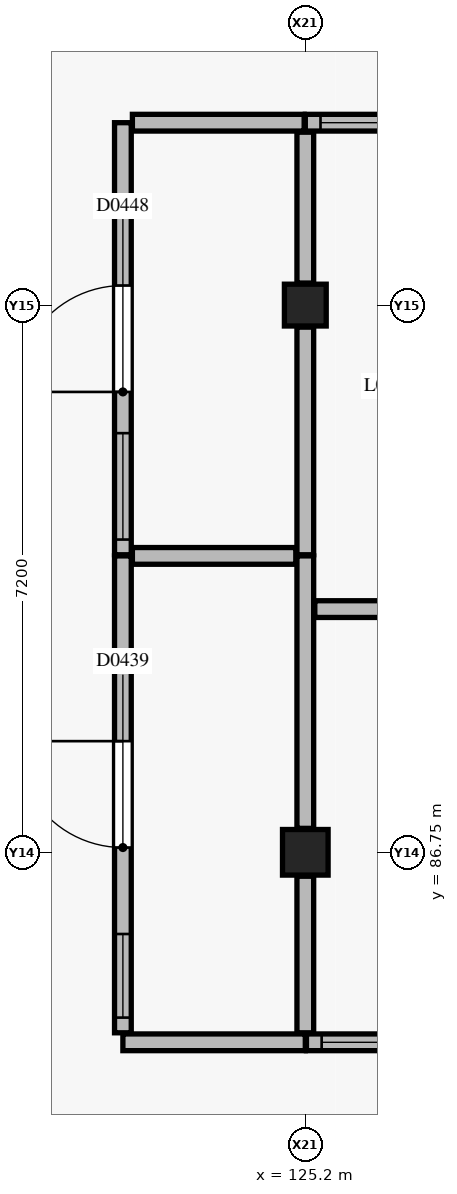
"""IFC4 building model, lengths in metres.
Left out: names, types, materials, properties, quantities, classifications, styles, units other than length and angle.
Written with IfcOpenShell. Run it as: python <this file> out.ifc"""

import sys

from ifc_helpers import new_model, si_unit, direction, frame, frame_2d, origin, origin_2d, place, context, subcontext, project, spatial, rectangle, extrude, element, fill, save


model = new_model("IFC4")
c1 = context("Model", 3, precision=1e-05, world=origin(), true_north=direction((0.0, 1.0)))
c2 = subcontext(c1, "Body", "Model", "MODEL_VIEW")
j1 = project(units=[si_unit("LENGTHUNIT", "METRE"), si_unit("PLANEANGLEUNIT", "RADIAN")], contexts=[c1])
p1 = place(None, origin())
s1 = spatial("IfcSite", under=j1, at=p1, CompositionType="ELEMENT")
p2 = place(p1, origin())
s2 = spatial("IfcBuilding", under=s1, at=p2, CompositionType="ELEMENT")
p3 = place(p2, frame((0.0, 0.0, 4.8)))
s3 = spatial("IfcBuildingStorey", under=s2, at=p3, CompositionType="ELEMENT", Elevation=4.8)
p4 = place(p3, frame((125.2, 86.75, 0.0), z_axis=(0.0, 0.0, 1.0), x_axis=(1.0, 0.0, 0.0)))
e1 = element("IfcColumn", 1, at=p4, inside=s3, PredefinedType="COLUMN", context=c2, shape_type="SweptSolid", body=[
    extrude(rectangle(XDim=0.6, YDim=0.6, at=origin_2d()), origin(), (0.0, 0.0, 1.0), 4.2),
])
p5 = place(p3, frame((125.2, 93.95, 0.0), z_axis=(0.0, 0.0, 1.0), x_axis=(1.0, 0.0, 0.0)))
e2 = element("IfcColumn", 2, at=p5, inside=s3, PredefinedType="COLUMN", context=c2, shape_type="SweptSolid", body=[
    extrude(rectangle(XDim=0.55, YDim=0.55, at=origin_2d()), origin(), (0.0, 0.0, 1.0), 4.2),
])
p6 = place(p3, frame((122.8, 84.25, 0.0), z_axis=(0.0, 0.0, 1.0), x_axis=(1.0, 0.0, 0.0)))
e3 = element("IfcWall", 3, at=p6, inside=s3, PredefinedType="PARTITIONING", context=c2, shape_type="SweptSolid", body=[
    extrude(rectangle(XDim=2.4, YDim=0.22, at=frame_2d((1.2, 0.0))), origin(), (0.0, 0.0, 1.0), 3.135),
])
p7 = place(p3, frame((122.8, 84.375, 0.0), z_axis=(0.0, 0.0, 1.0), x_axis=(0.0, 1.0, 0.0)))
e4 = element("IfcWall", 4, at=p7, inside=s3, PredefinedType="PARTITIONING", context=c2, shape_type="SweptSolid", body=[
    extrude(rectangle(XDim=6.275, YDim=0.22, at=frame_2d((3.137, 0.0))), origin(), (0.0, 0.0, 1.0), 3.285),
])
p8 = place(p7, frame((2.438, 0.0, 0.0)))
e5 = element("IfcOpeningElement", 5, at=p8, cuts=e4, PredefinedType="OPENING", context=c2, shape_type="SweptSolid", body=[
    extrude(rectangle(XDim=1.4, YDim=2.2, at=frame_2d((0.7, 1.1))), frame((0.0, 0.12, 0.0), z_axis=(0.0, -1.0, 0.0), x_axis=(1.0, 0.0, 0.0)), (0.0, 0.0, 1.0), 0.24),
])
p9 = place(p7, frame((0.2, 0.0, 1.05)))
e6 = element("IfcOpeningElement", 6, at=p9, cuts=e4, PredefinedType="OPENING", context=c2, shape_type="SweptSolid", body=[
    extrude(rectangle(XDim=1.1, YDim=1.1, at=frame_2d((0.55, 0.55))), frame((0.0, 0.12, 0.0), z_axis=(0.0, -1.0, 0.0), x_axis=(1.0, 0.0, 0.0)), (0.0, 0.0, 1.0), 0.24),
])
p10 = place(p3, frame((125.215, 84.25, 0.0), z_axis=(0.0, 0.0, 1.0), x_axis=(1.0, 0.0, 0.0)))
e7 = element("IfcWall", 7, at=p10, inside=s3, PredefinedType="PARTITIONING", context=c2, shape_type="SweptSolid", body=[
    extrude(rectangle(XDim=7.185, YDim=0.22, at=frame_2d((3.592, 0.0))), origin(), (0.0, 0.0, 1.0), 3.135),
])
p11 = place(p10, frame((2.893, 0.0, 0.0)))
e8 = element("IfcOpeningElement", 8, at=p11, cuts=e7, PredefinedType="OPENING", context=c2, shape_type="SweptSolid", body=[
    extrude(rectangle(XDim=1.4, YDim=2.2, at=frame_2d((0.7, 1.1))), frame((0.0, 0.12, 0.0), z_axis=(0.0, -1.0, 0.0), x_axis=(1.0, 0.0, 0.0)), (0.0, 0.0, 1.0), 0.24),
])
p12 = place(p10, frame((0.2, 0.0, 1.05)))
e9 = element("IfcOpeningElement", 9, at=p12, cuts=e7, PredefinedType="OPENING", context=c2, shape_type="SweptSolid", body=[
    extrude(rectangle(XDim=1.4, YDim=1.1, at=frame_2d((0.7, 0.55))), frame((0.0, 0.12, 0.0), z_axis=(0.0, -1.0, 0.0), x_axis=(1.0, 0.0, 0.0)), (0.0, 0.0, 1.0), 0.24),
])
p13 = place(p3, frame((125.2, 96.35, 0.0), z_axis=(0.0, 0.0, 1.0), x_axis=(1.0, 0.0, 0.0)))
e10 = element("IfcWall", 10, at=p13, inside=s3, PredefinedType="PARTITIONING", context=c2, shape_type="SweptSolid", body=[
    extrude(rectangle(XDim=7.2, YDim=0.22, at=frame_2d((3.6, 0.0))), origin(), (0.0, 0.0, 1.0), 3.135),
])
p14 = place(p13, frame((2.9, 0.0, 0.0)))
e11 = element("IfcOpeningElement", 11, at=p14, cuts=e10, PredefinedType="OPENING", context=c2, shape_type="SweptSolid", body=[
    extrude(rectangle(XDim=1.4, YDim=2.2, at=frame_2d((0.7, 1.1))), frame((0.0, 0.12, 0.0), z_axis=(0.0, -1.0, 0.0), x_axis=(1.0, 0.0, 0.0)), (0.0, 0.0, 1.0), 0.24),
])
p15 = place(p13, frame((0.2, 0.0, 1.05)))
e12 = element("IfcOpeningElement", 12, at=p15, cuts=e10, PredefinedType="OPENING", context=c2, shape_type="SweptSolid", body=[
    extrude(rectangle(XDim=1.1, YDim=1.1, at=frame_2d((0.55, 0.55))), frame((0.0, 0.12, 0.0), z_axis=(0.0, -1.0, 0.0), x_axis=(1.0, 0.0, 0.0)), (0.0, 0.0, 1.0), 0.24),
])
p16 = place(p3, frame((122.8, 90.665, 0.0), z_axis=(0.0, 0.0, 1.0), x_axis=(0.0, 1.0, 0.0)))
e13 = element("IfcWall", 13, at=p16, inside=s3, PredefinedType="PARTITIONING", context=c2, shape_type="SweptSolid", body=[
    extrude(rectangle(XDim=5.685, YDim=0.22, at=frame_2d((2.843, 0.0))), origin(), (0.0, 0.0, 1.0), 3.385),
])
p17 = place(p16, frame((2.143, 0.0, 0.0)))
e14 = element("IfcOpeningElement", 14, at=p17, cuts=e13, PredefinedType="OPENING", context=c2, shape_type="SweptSolid", body=[
    extrude(rectangle(XDim=1.4, YDim=2.2, at=frame_2d((0.7, 1.1))), frame((0.0, 0.12, 0.0), z_axis=(0.0, -1.0, 0.0), x_axis=(1.0, 0.0, 0.0)), (0.0, 0.0, 1.0), 0.24),
])
p18 = place(p16, frame((0.2, 0.0, 1.05)))
e15 = element("IfcOpeningElement", 15, at=p18, cuts=e13, PredefinedType="OPENING", context=c2, shape_type="SweptSolid", body=[
    extrude(rectangle(XDim=1.4, YDim=1.1, at=frame_2d((0.7, 0.55))), frame((0.0, 0.12, 0.0), z_axis=(0.0, -1.0, 0.0), x_axis=(1.0, 0.0, 0.0)), (0.0, 0.0, 1.0), 0.24),
])
p19 = place(p3, frame((122.925, 96.35, 0.0), z_axis=(0.0, 0.0, 1.0), x_axis=(1.0, 0.0, 0.0)))
e16 = element("IfcWall", 16, at=p19, inside=s3, PredefinedType="PARTITIONING", context=c2, shape_type="SweptSolid", body=[
    extrude(rectangle(XDim=2.26, YDim=0.22, at=frame_2d((1.13, 0.0))), origin(), (0.0, 0.0, 1.0), 3.355),
])
p20 = place(p3, frame((125.2, 84.375, 0.0), z_axis=(0.0, 0.0, 1.0), x_axis=(0.0, 1.0, 0.0)))
e17 = element("IfcWall", 17, at=p20, inside=s3, PredefinedType="PARTITIONING", context=c2, shape_type="SweptSolid", body=[
    extrude(rectangle(XDim=2.06, YDim=0.22, at=frame_2d((1.03, 0.0))), origin(), (0.0, 0.0, 1.0), 3.135),
])
p21 = place(p3, frame((125.2, 87.065, 0.0), z_axis=(0.0, 0.0, 1.0), x_axis=(0.0, 1.0, 0.0)))
e18 = element("IfcWall", 18, at=p21, inside=s3, PredefinedType="PARTITIONING", context=c2, shape_type="SweptSolid", body=[
    extrude(rectangle(XDim=3.585, YDim=0.22, at=frame_2d((1.792, 0.0))), origin(), (0.0, 0.0, 1.0), 3.235),
])
p22 = place(p3, frame((122.925, 90.65, 0.0), z_axis=(0.0, 0.0, 1.0), x_axis=(1.0, 0.0, 0.0)))
e19 = element("IfcWall", 19, at=p22, inside=s3, PredefinedType="PARTITIONING", context=c2, shape_type="SweptSolid", body=[
    extrude(rectangle(XDim=2.15, YDim=0.22, at=frame_2d((1.075, 0.0))), origin(), (0.0, 0.0, 1.0), 3.95),
])
p23 = place(p3, frame((125.325, 89.95, 0.0), z_axis=(0.0, 0.0, 1.0), x_axis=(1.0, 0.0, 0.0)))
e20 = element("IfcWall", 20, at=p23, inside=s3, PredefinedType="PARTITIONING", context=c2, shape_type="SweptSolid", body=[
    extrude(rectangle(XDim=7.075, YDim=0.22, at=frame_2d((3.538, 0.0))), origin(), (0.0, 0.0, 1.0), 3.385),
])
p24 = place(p3, frame((125.2, 90.665, 0.0), z_axis=(0.0, 0.0, 1.0), x_axis=(0.0, 1.0, 0.0)))
e21 = element("IfcWall", 21, at=p24, inside=s3, PredefinedType="PARTITIONING", context=c2, shape_type="SweptSolid", body=[
    extrude(rectangle(XDim=2.995, YDim=0.22, at=frame_2d((1.498, 0.0))), origin(), (0.0, 0.0, 1.0), 3.235),
])
p25 = place(p3, frame((125.2, 94.24, 0.0), z_axis=(0.0, 0.0, 1.0), x_axis=(0.0, 1.0, 0.0)))
e22 = element("IfcWall", 22, at=p25, inside=s3, PredefinedType="PARTITIONING", context=c2, shape_type="SweptSolid", body=[
    extrude(rectangle(XDim=1.985, YDim=0.22, at=frame_2d((0.993, 0.0))), origin(), (0.0, 0.0, 1.0), 3.355),
])
p26 = place(p8, origin())
e23 = element("IfcDoor", 23, at=p26, inside=s3, OperationType="SINGLE_SWING_RIGHT", PredefinedType="DOOR", context=c2, shape_type="SweptSolid", body=[
    extrude(rectangle(XDim=1.4, YDim=2.2, at=frame_2d((0.7, 1.1))), frame((0.0, 0.025, 0.0), z_axis=(0.0, -1.0, 0.0), x_axis=(1.0, 0.0, 0.0)), (0.0, 0.0, 1.0), 0.05),
])
fill(e5, e23)
p27 = place(p9, origin())
e24 = element("IfcWindow", 24, at=p27, inside=s3, PartitioningType="SINGLE_PANEL", PredefinedType="WINDOW", context=c2, shape_type="SweptSolid", body=[
    extrude(rectangle(XDim=1.1, YDim=1.1, at=frame_2d((0.55, 0.55))), frame((0.0, 0.03, 0.0), z_axis=(0.0, -1.0, 0.0), x_axis=(1.0, 0.0, 0.0)), (0.0, 0.0, 1.0), 0.06),
])
fill(e6, e24)
p28 = place(p12, origin())
e25 = element("IfcWindow", 25, at=p28, inside=s3, PartitioningType="SINGLE_PANEL", PredefinedType="WINDOW", context=c2, shape_type="SweptSolid", body=[
    extrude(rectangle(XDim=1.4, YDim=1.1, at=frame_2d((0.7, 0.55))), frame((0.0, 0.03, 0.0), z_axis=(0.0, -1.0, 0.0), x_axis=(1.0, 0.0, 0.0)), (0.0, 0.0, 1.0), 0.06),
])
fill(e9, e25)
p29 = place(p15, origin())
e26 = element("IfcWindow", 26, at=p29, inside=s3, PartitioningType="SINGLE_PANEL", PredefinedType="WINDOW", context=c2, shape_type="SweptSolid", body=[
    extrude(rectangle(XDim=1.1, YDim=1.1, at=frame_2d((0.55, 0.55))), frame((0.0, 0.03, 0.0), z_axis=(0.0, -1.0, 0.0), x_axis=(1.0, 0.0, 0.0)), (0.0, 0.0, 1.0), 0.06),
])
fill(e12, e26)
p30 = place(p17, origin())
e27 = element("IfcDoor", 27, at=p30, inside=s3, OperationType="SINGLE_SWING_LEFT", PredefinedType="DOOR", context=c2, shape_type="SweptSolid", body=[
    extrude(rectangle(XDim=1.4, YDim=2.2, at=frame_2d((0.7, 1.1))), frame((0.0, 0.025, 0.0), z_axis=(0.0, -1.0, 0.0), x_axis=(1.0, 0.0, 0.0)), (0.0, 0.0, 1.0), 0.05),
])
fill(e14, e27)
p31 = place(p18, origin())
e28 = element("IfcWindow", 28, at=p31, inside=s3, PartitioningType="SINGLE_PANEL", PredefinedType="WINDOW", context=c2, shape_type="SweptSolid", body=[
    extrude(rectangle(XDim=1.4, YDim=1.1, at=frame_2d((0.7, 0.55))), frame((0.0, 0.03, 0.0), z_axis=(0.0, -1.0, 0.0), x_axis=(1.0, 0.0, 0.0)), (0.0, 0.0, 1.0), 0.06),
])
fill(e15, e28)
save(model, sys.argv[1])
